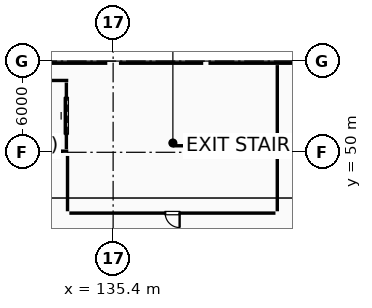
"""IFC4 building model, lengths in metres.
Left out: names, types, materials, properties, quantities, classifications, styles, units other than length and angle.
Written with IfcOpenShell. Run it as: python <this file> out.ifc"""

import sys

from ifc_helpers import new_model, si_unit, direction, frame, frame_2d, origin, origin_2d, place, context, subcontext, project, spatial, rectangle, extrude, element, fill, save


model = new_model("IFC4")
c1 = context("Model", 3, precision=1e-05, world=origin(), true_north=direction((0.0, 1.0)))
c2 = subcontext(c1, "Body", "Model", "MODEL_VIEW")
j1 = project(units=[si_unit("LENGTHUNIT", "METRE"), si_unit("PLANEANGLEUNIT", "RADIAN")], contexts=[c1])
p1 = place(None, origin())
s1 = spatial("IfcSite", under=j1, at=p1, CompositionType="ELEMENT")
p2 = place(p1, origin())
s2 = spatial("IfcBuilding", under=s1, at=p2, CompositionType="ELEMENT")
p3 = place(p2, origin())
s3 = spatial("IfcBuildingStorey", under=s2, at=p3, CompositionType="ELEMENT", Elevation=0.0)
for number, where, z_axis, x_axis in (
    (1, (135.4, 50.0, 0.0), (0.0, 0.0, 1.0), (1.0, 0.0, 0.0)),
    (2, (135.4, 56.0, 0.0), (0.0, 0.0, 1.0), (1.0, 0.0, 0.0)),
):
    element("IfcColumn", number, at=place(p3, frame(where, z_axis=z_axis, x_axis=x_axis)), inside=s3, PredefinedType="COLUMN", context=c2, shape_type="SweptSolid", body=[
        extrude(rectangle(XDim=0.75, YDim=0.75, at=origin_2d()), origin(), (0.0, 0.0, 1.0), 5.4),
    ])
p4 = place(p3, frame((141.5, 56.0, 0.0), z_axis=(0.0, 0.0, 1.0), x_axis=(1.0, 0.0, 0.0)))
e3 = element("IfcColumn", 3, at=p4, inside=s3, PredefinedType="PILASTER", context=c2, shape_type="SweptSolid", body=[
    extrude(rectangle(XDim=0.35, YDim=0.7, at=origin_2d()), origin(), (0.0, 0.0, 1.0), 5.4),
])
p5 = place(p3, frame((126.783, 55.86, 0.0), z_axis=(0.0, 0.0, 1.0), x_axis=(1.0, 0.0, 0.0)))
e4 = element("IfcWall", 4, at=p5, inside=s3, PredefinedType="ELEMENTEDWALL", context=c2, shape_type="SweptSolid", body=[
    extrude(rectangle(XDim=8.234, YDim=0.24, at=frame_2d((4.117, 0.0))), origin(), (0.0, 0.0, 1.0), 4.555),
])
p6 = place(p5, frame((3.492, 0.0, 0.95)))
e5 = element("IfcOpeningElement", 5, at=p6, cuts=e4, PredefinedType="OPENING", context=c2, shape_type="SweptSolid", body=[
    extrude(rectangle(XDim=1.25, YDim=1.2, at=frame_2d((0.625, 0.6))), frame((0.0, 0.13, 0.0), z_axis=(0.0, -1.0, 0.0), x_axis=(1.0, 0.0, 0.0)), (0.0, 0.0, 1.0), 0.26),
])
p7 = place(p3, frame((135.783, 55.86, 0.0), z_axis=(0.0, 0.0, 1.0), x_axis=(1.0, 0.0, 0.0)))
e6 = element("IfcWall", 6, at=p7, inside=s3, PredefinedType="ELEMENTEDWALL", context=c2, shape_type="SweptSolid", body=[
    extrude(rectangle(XDim=5.545, YDim=0.24, at=frame_2d((2.772, 0.0))), origin(), (0.0, 0.0, 1.0), 4.605),
])
p8 = place(p7, frame((2.055, 0.0, 0.95)))
e7 = element("IfcOpeningElement", 7, at=p8, cuts=e6, PredefinedType="OPENING", context=c2, shape_type="SweptSolid", body=[
    extrude(rectangle(XDim=1.25, YDim=1.5, at=frame_2d((0.625, 0.75))), frame((0.0, 0.13, 0.0), z_axis=(0.0, -1.0, 0.0), x_axis=(1.0, 0.0, 0.0)), (0.0, 0.0, 1.0), 0.26),
])
p9 = place(p3, frame((141.672, 55.86, 0.0), z_axis=(0.0, 0.0, 1.0), x_axis=(1.0, 0.0, 0.0)))
e8 = element("IfcWall", 8, at=p9, inside=s3, PredefinedType="ELEMENTEDWALL", context=c2, shape_type="SweptSolid", body=[
    extrude(rectangle(XDim=5.795, YDim=0.24, at=frame_2d((2.897, 0.0))), origin(), (0.0, 0.0, 1.0), 4.605),
])
p10 = place(p9, frame((2.366, 0.0, 0.95)))
e9 = element("IfcOpeningElement", 9, at=p10, cuts=e8, PredefinedType="OPENING", context=c2, shape_type="SweptSolid", body=[
    extrude(rectangle(XDim=1.25, YDim=1.8, at=frame_2d((0.625, 0.9))), frame((0.0, 0.13, 0.0), z_axis=(0.0, -1.0, 0.0), x_axis=(1.0, 0.0, 0.0)), (0.0, 0.0, 1.0), 0.26),
])
for number, where, z_axis, x_axis in (
    (10, (128.75, 50.075, 0.0), (0.0, 0.0, 1.0), (1.0, 0.0, 0.0)),
    (11, (132.45, 54.725, 0.0), (0.0, 0.0, 1.0), (-1.0, 0.0, 0.0)),
):
    element("IfcWall", number, at=place(p3, frame(where, z_axis=z_axis, x_axis=x_axis)), inside=s3, PredefinedType="STANDARD", context=c2, shape_type="SweptSolid", body=[
        extrude(rectangle(XDim=3.7, YDim=0.25, at=frame_2d((1.85, 0.0))), origin(), (0.0, 0.0, 1.0), 5.11),
    ])
p11 = place(p3, frame((132.325, 50.21, 0.0), z_axis=(0.0, 0.0, 1.0), x_axis=(0.0, 1.0, 0.0)))
e12 = element("IfcWall", 12, at=p11, inside=s3, PredefinedType="STANDARD", context=c2, shape_type="SweptSolid", body=[
    extrude(rectangle(XDim=4.38, YDim=0.25, at=frame_2d((2.19, 0.0))), origin(), (0.0, 0.0, 1.0), 5.11),
])
p12 = place(p11, frame((0.99, 0.0, 0.0)))
e13 = element("IfcOpeningElement", 13, at=p12, cuts=e12, PredefinedType="OPENING", context=c2, shape_type="SweptSolid", body=[
    extrude(rectangle(XDim=2.4, YDim=2.55, at=frame_2d((1.2, 1.275))), frame((0.0, 0.135, 0.0), z_axis=(0.0, -1.0, 0.0), x_axis=(1.0, 0.0, 0.0)), (0.0, 0.0, 1.0), 0.27),
])
p13 = place(p3, frame((146.2, 55.736, 0.0), z_axis=(0.0, 0.0, 1.0), x_axis=(0.0, -1.0, 0.0)))
e14 = element("IfcWall", 14, at=p13, inside=s3, PredefinedType="PARTITIONING", context=c2, shape_type="SweptSolid", body=[
    extrude(rectangle(XDim=9.616, YDim=0.2, at=frame_2d((4.808, 0.0))), origin(), (0.0, 0.0, 1.0), 5.11),
])
p14 = place(p3, frame((146.08, 46.0, 0.0), z_axis=(0.0, 0.0, 1.0), x_axis=(-1.0, 0.0, 0.0)))
e15 = element("IfcWall", 15, at=p14, inside=s3, PredefinedType="PARTITIONING", context=c2, shape_type="SweptSolid", body=[
    extrude(rectangle(XDim=13.56, YDim=0.2, at=frame_2d((6.78, 0.0))), origin(), (0.0, 0.0, 1.0), 5.11),
])
p15 = place(p14, frame((6.305, 0.0, 0.0)))
e16 = element("IfcOpeningElement", 16, at=p15, cuts=e15, PredefinedType="OPENING", context=c2, shape_type="SweptSolid", body=[
    extrude(rectangle(XDim=0.95, YDim=2.15, at=frame_2d((0.475, 1.075))), frame((0.0, 0.11, 0.0), z_axis=(0.0, -1.0, 0.0), x_axis=(1.0, 0.0, 0.0)), (0.0, 0.0, 1.0), 0.22),
])
p16 = place(p3, frame((132.4, 46.12, 0.0), z_axis=(0.0, 0.0, 1.0), x_axis=(0.0, 1.0, 0.0)))
e17 = element("IfcWall", 17, at=p16, inside=s3, PredefinedType="PARTITIONING", context=c2, shape_type="SweptSolid", body=[
    extrude(rectangle(XDim=3.64, YDim=0.2, at=frame_2d((1.82, 0.0))), origin(), (0.0, 0.0, 1.0), 5.11),
])
p17 = place(p6, origin())
e18 = element("IfcWindow", 18, at=p17, inside=s3, PartitioningType="SINGLE_PANEL", PredefinedType="WINDOW", context=c2, shape_type="SweptSolid", body=[
    extrude(rectangle(XDim=1.25, YDim=1.2, at=frame_2d((0.625, 0.6))), frame((0.0, 0.03, 0.0), z_axis=(0.0, -1.0, 0.0), x_axis=(1.0, 0.0, 0.0)), (0.0, 0.0, 1.0), 0.06),
])
fill(e5, e18)
p18 = place(p8, origin())
e19 = element("IfcWindow", 19, at=p18, inside=s3, PartitioningType="SINGLE_PANEL", PredefinedType="WINDOW", context=c2, shape_type="SweptSolid", body=[
    extrude(rectangle(XDim=1.25, YDim=1.5, at=frame_2d((0.625, 0.75))), frame((0.0, 0.03, 0.0), z_axis=(0.0, -1.0, 0.0), x_axis=(1.0, 0.0, 0.0)), (0.0, 0.0, 1.0), 0.06),
])
fill(e7, e19)
p19 = place(p10, origin())
e20 = element("IfcWindow", 20, at=p19, inside=s3, PartitioningType="SINGLE_PANEL", PredefinedType="WINDOW", context=c2, shape_type="SweptSolid", body=[
    extrude(rectangle(XDim=1.25, YDim=1.8, at=frame_2d((0.625, 0.9))), frame((0.0, 0.03, 0.0), z_axis=(0.0, -1.0, 0.0), x_axis=(1.0, 0.0, 0.0)), (0.0, 0.0, 1.0), 0.06),
])
fill(e9, e20)
p20 = place(p12, origin())
e21 = element("IfcDoor", 21, at=p20, inside=s3, OperationType="DOUBLE_DOOR_SLIDING", PredefinedType="DOOR", context=c2, shape_type="SweptSolid", body=[
    extrude(rectangle(XDim=2.4, YDim=2.55, at=frame_2d((1.2, 1.275))), frame((0.0, 0.025, 0.0), z_axis=(0.0, -1.0, 0.0), x_axis=(1.0, 0.0, 0.0)), (0.0, 0.0, 1.0), 0.05),
])
fill(e13, e21)
p21 = place(p15, origin())
e22 = element("IfcDoor", 22, at=p21, inside=s3, OperationType="SINGLE_SWING_LEFT", PredefinedType="DOOR", context=c2, shape_type="SweptSolid", body=[
    extrude(rectangle(XDim=0.95, YDim=2.15, at=frame_2d((0.475, 1.075))), frame((0.0, 0.025, 0.0), z_axis=(0.0, -1.0, 0.0), x_axis=(1.0, 0.0, 0.0)), (0.0, 0.0, 1.0), 0.05),
])
fill(e16, e22)
save(model, sys.argv[1])
